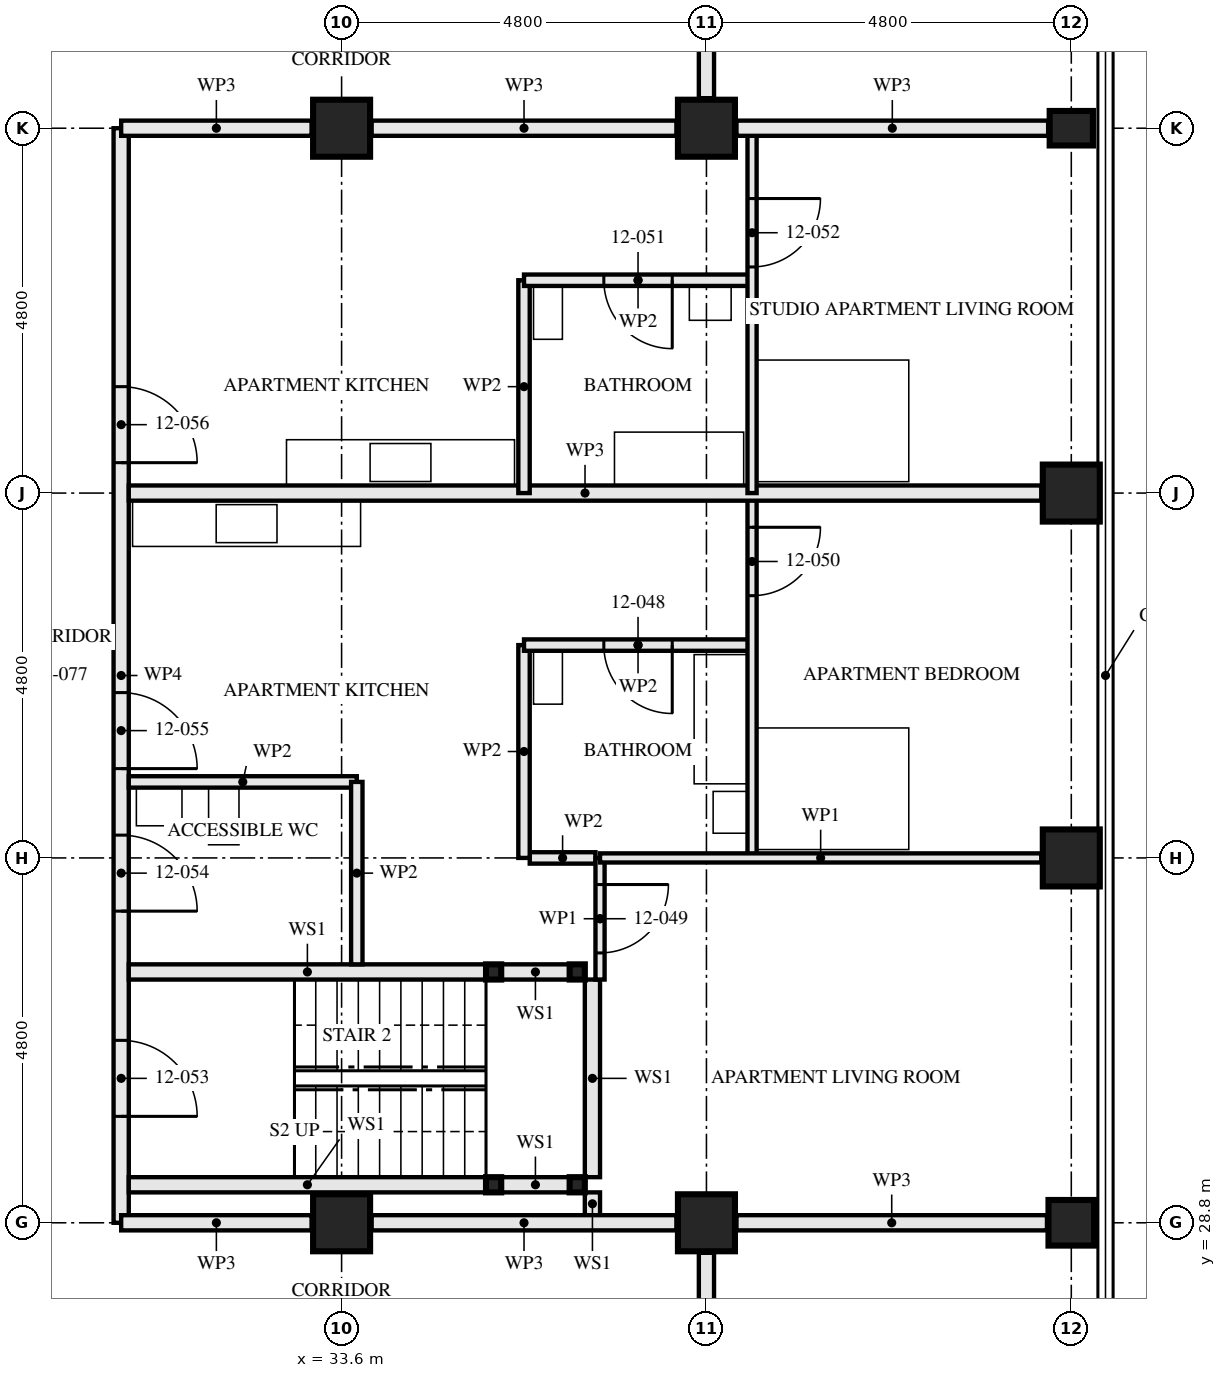
"""IFC4 building model, lengths in metres.
Left out: names, types, materials, properties, quantities, classifications, styles, units other than length and angle.
Written with IfcOpenShell. Run it as: python <this file> out.ifc"""

import sys

from ifc_helpers import new_model, si_unit, direction, frame, frame_2d, origin, origin_2d, place, context, subcontext, project, spatial, rectangle, hollow_rectangle, i_section, extrude, element, fill, save


model = new_model("IFC4")
c1 = context("Model", 3, precision=1e-05, world=origin(), true_north=direction((0.0, 1.0)))
c2 = subcontext(c1, "Body", "Model", "MODEL_VIEW")
j1 = project(units=[si_unit("LENGTHUNIT", "METRE"), si_unit("PLANEANGLEUNIT", "RADIAN")], contexts=[c1])
p1 = place(None, origin())
s1 = spatial("IfcSite", under=j1, at=p1, CompositionType="ELEMENT")
p2 = place(p1, origin())
s2 = spatial("IfcBuilding", under=s1, at=p2, CompositionType="ELEMENT")
p3 = place(p2, frame((0.0, 0.0, 48.0)))
s3 = spatial("IfcBuildingStorey", under=s2, at=p3, CompositionType="ELEMENT", Elevation=48.0)
for number, where, z_axis, x_axis in (
    (1, (33.6, 28.8, 0.0), (0.0, 0.0, 1.0), (0.0, 1.0, 0.0)),
    (2, (33.6, 43.2, 0.0), (0.0, 0.0, 1.0), (0.0, 1.0, 0.0)),
    (3, (38.4, 28.8, 0.0), (0.0, 0.0, 1.0), (0.0, 1.0, 0.0)),
    (4, (38.4, 43.2, 0.0), (0.0, 0.0, 1.0), (0.0, 1.0, 0.0)),
):
    element("IfcColumn", number, at=place(p3, frame(where, z_axis=z_axis, x_axis=x_axis)), inside=s3, PredefinedType="COLUMN", context=c2, shape_type="SweptSolid", body=[
        extrude(hollow_rectangle(XDim=0.75, YDim=0.75, WallThickness=0.08, at=origin_2d()), origin(), (0.0, 0.0, 1.0), 3.5),
    ])
p4 = place(p3, frame((43.2, 28.8, 0.0), z_axis=(0.0, 0.0, 1.0), x_axis=(0.0, 1.0, 0.0)))
e5 = element("IfcColumn", 5, at=p4, inside=s3, PredefinedType="COLUMN", context=c2, shape_type="SweptSolid", body=[
    extrude(hollow_rectangle(XDim=0.6, YDim=0.6, WallThickness=0.08, at=origin_2d()), origin(), (0.0, 0.0, 1.0), 3.5),
])
for number, where, z_axis, x_axis in (
    (6, (43.2, 33.6, 0.0), (0.0, 0.0, 1.0), (1.0, 0.0, 0.0)),
    (7, (43.2, 38.4, 0.0), (0.0, 0.0, 1.0), (1.0, 0.0, 0.0)),
):
    element("IfcColumn", number, at=place(p3, frame(where, z_axis=z_axis, x_axis=x_axis)), inside=s3, PredefinedType="COLUMN", context=c2, shape_type="SweptSolid", body=[
        extrude(hollow_rectangle(XDim=0.75, YDim=0.75, WallThickness=0.08, at=origin_2d()), origin(), (0.0, 0.0, 1.0), 3.5),
    ])
p5 = place(p3, frame((43.2, 43.2, 0.0), z_axis=(0.0, 0.0, 1.0), x_axis=(0.0, 1.0, 0.0)))
e8 = element("IfcColumn", 8, at=p5, inside=s3, PredefinedType="COLUMN", context=c2, shape_type="SweptSolid", body=[
    extrude(i_section(OverallWidth=0.454, OverallDepth=0.569, WebThickness=0.078, FlangeThickness=0.125, FilletRadius=0.015, at=origin_2d()), origin(), (0.0, 0.0, 1.0), 3.5),
])
for number, where, z_axis, x_axis in (
    (9, (36.7, 29.3, 0.0), (0.0, 0.0, 1.0), (1.0, 0.0, 0.0)),
    (10, (36.7, 32.1, 0.0), (0.0, 0.0, 1.0), (1.0, 0.0, 0.0)),
    (11, (35.6, 29.3, 0.0), (0.0, 0.0, 1.0), (1.0, 0.0, 0.0)),
    (12, (35.6, 32.1, 0.0), (0.0, 0.0, 1.0), (1.0, 0.0, 0.0)),
):
    element("IfcColumn", number, at=place(p3, frame(where, z_axis=z_axis, x_axis=x_axis)), inside=s3, PredefinedType="COLUMN", context=c2, shape_type="SweptSolid", body=[
        extrude(hollow_rectangle(XDim=0.2, YDim=0.2, WallThickness=0.008, at=origin_2d()), origin(), (0.0, 0.0, 1.0), 3.33),
    ])
p6 = place(p3, frame((38.4, 26.8, 0.0), z_axis=(0.0, 0.0, 1.0), x_axis=(0.0, 1.0, 0.0)))
e13 = element("IfcWall", 13, at=p6, inside=s3, PredefinedType="PARTITIONING", context=c2, shape_type="SweptSolid", body=[
    extrude(rectangle(XDim=1.605, YDim=0.2, at=frame_2d((0.802, 0.0))), origin(), (0.0, 0.0, 1.0), 3.33),
])
p7 = place(p3, frame((36.6, 29.3, 0.0), z_axis=(0.0, 0.0, 1.0), x_axis=(-1.0, 0.0, 0.0)))
e14 = element("IfcWall", 14, at=p7, inside=s3, PredefinedType="SOLIDWALL", context=c2, shape_type="SweptSolid", body=[
    extrude(rectangle(XDim=0.9, YDim=0.2, at=frame_2d((0.45, 0.0))), origin(), (0.0, 0.0, 1.0), 2.99),
])
p8 = place(p3, frame((35.5, 29.3, 0.0), z_axis=(0.0, 0.0, 1.0), x_axis=(-1.0, 0.0, 0.0)))
e15 = element("IfcWall", 15, at=p8, inside=s3, PredefinedType="SOLIDWALL", context=c2, shape_type="SweptSolid", body=[
    extrude(rectangle(XDim=4.7, YDim=0.2, at=frame_2d((2.35, 0.0))), origin(), (0.0, 0.0, 1.0), 2.99),
])
p9 = place(p3, frame((36.6, 32.1, 0.0), z_axis=(0.0, 0.0, 1.0), x_axis=(-1.0, 0.0, 0.0)))
e16 = element("IfcWall", 16, at=p9, inside=s3, PredefinedType="SOLIDWALL", context=c2, shape_type="SweptSolid", body=[
    extrude(rectangle(XDim=0.9, YDim=0.2, at=frame_2d((0.45, 0.0))), origin(), (0.0, 0.0, 1.0), 2.99),
])
p10 = place(p3, frame((35.5, 32.1, 0.0), z_axis=(0.0, 0.0, 1.0), x_axis=(-1.0, 0.0, 0.0)))
e17 = element("IfcWall", 17, at=p10, inside=s3, PredefinedType="SOLIDWALL", context=c2, shape_type="SweptSolid", body=[
    extrude(rectangle(XDim=4.7, YDim=0.2, at=frame_2d((2.35, 0.0))), origin(), (0.0, 0.0, 1.0), 2.99),
])
p11 = place(p3, frame((36.9, 28.9, 0.0), z_axis=(0.0, 0.0, 1.0), x_axis=(0.0, 1.0, 0.0)))
e18 = element("IfcWall", 18, at=p11, inside=s3, PredefinedType="SOLIDWALL", context=c2, shape_type="SweptSolid", body=[
    extrude(rectangle(XDim=0.3, YDim=0.2, at=frame_2d((0.15, 0.0))), origin(), (0.0, 0.0, 1.0), 3.33),
])
p12 = place(p3, frame((36.9, 29.4, 0.0), z_axis=(0.0, 0.0, 1.0), x_axis=(0.0, 1.0, 0.0)))
e19 = element("IfcWall", 19, at=p12, inside=s3, PredefinedType="SOLIDWALL", context=c2, shape_type="SweptSolid", body=[
    extrude(rectangle(XDim=2.6, YDim=0.2, at=frame_2d((1.3, 0.0))), origin(), (0.0, 0.0, 1.0), 3.33),
])
p13 = place(p3, frame((33.8, 32.2, 0.0), z_axis=(0.0, 0.0, 1.0), x_axis=(0.0, 1.0, 0.0)))
e20 = element("IfcWall", 20, at=p13, inside=s3, PredefinedType="PARTITIONING", context=c2, shape_type="SweptSolid", body=[
    extrude(rectangle(XDim=2.4, YDim=0.15, at=frame_2d((1.2, 0.0))), origin(), (0.0, 0.0, 1.0), 2.55),
])
p14 = place(p3, frame((33.8, 34.6, 0.0), z_axis=(0.0, 0.0, 1.0), x_axis=(-1.0, 0.0, 0.0)))
e21 = element("IfcWall", 21, at=p14, inside=s3, PredefinedType="PARTITIONING", context=c2, shape_type="SweptSolid", body=[
    extrude(rectangle(XDim=3.0, YDim=0.15, at=frame_2d((1.5, 0.0))), origin(), (0.0, 0.0, 1.0), 3.33),
])
p15 = place(p3, frame((39.0, 36.4, 0.0), z_axis=(0.0, 0.0, 1.0), x_axis=(-1.0, 0.0, 0.0)))
e22 = element("IfcWall", 22, at=p15, inside=s3, PredefinedType="PARTITIONING", context=c2, shape_type="SweptSolid", body=[
    extrude(rectangle(XDim=3.0, YDim=0.15, at=frame_2d((1.5, 0.0))), origin(), (0.0, 0.0, 1.0), 3.33),
])
p16 = place(p15, frame((1.05, 0.0, 0.0)))
e23 = element("IfcOpeningElement", 23, at=p16, cuts=e22, PredefinedType="OPENING", context=c2, shape_type="SweptSolid", body=[
    extrude(rectangle(XDim=0.9, YDim=2.1, at=frame_2d((0.45, 1.05))), frame((0.0, 0.085, 0.0), z_axis=(0.0, -1.0, 0.0), x_axis=(1.0, 0.0, 0.0)), (0.0, 0.0, 1.0), 0.171),
])
p17 = place(p3, frame((36.0, 33.6, 0.0), z_axis=(0.0, 0.0, 1.0), x_axis=(0.0, 1.0, 0.0)))
e24 = element("IfcWall", 24, at=p17, inside=s3, PredefinedType="PARTITIONING", context=c2, shape_type="SweptSolid", body=[
    extrude(rectangle(XDim=2.8, YDim=0.15, at=frame_2d((1.4, 0.0))), origin(), (0.0, 0.0, 1.0), 3.33),
])
p18 = place(p3, frame((37.0, 32.0, 0.0), z_axis=(0.0, 0.0, 1.0), x_axis=(0.0, 1.0, 0.0)))
e25 = element("IfcWall", 25, at=p18, inside=s3, PredefinedType="PARTITIONING", context=c2, shape_type="SweptSolid", body=[
    extrude(rectangle(XDim=1.6, YDim=0.12, at=frame_2d((0.8, 0.0))), origin(), (0.0, 0.0, 1.0), 3.33),
])
p19 = place(p18, frame((0.35, 0.0, 0.0)))
e26 = element("IfcOpeningElement", 26, at=p19, cuts=e25, PredefinedType="OPENING", context=c2, shape_type="SweptSolid", body=[
    extrude(rectangle(XDim=0.9, YDim=2.1, at=frame_2d((0.45, 1.05))), frame((0.0, 0.071, 0.0), z_axis=(0.0, -1.0, 0.0), x_axis=(1.0, 0.0, 0.0)), (0.0, 0.0, 1.0), 0.141),
])
p20 = place(p3, frame((39.0, 33.6, 0.0), z_axis=(0.0, 0.0, 1.0), x_axis=(0.0, 1.0, 0.0)))
e27 = element("IfcWall", 27, at=p20, inside=s3, PredefinedType="PARTITIONING", context=c2, shape_type="SweptSolid", body=[
    extrude(rectangle(XDim=4.8, YDim=0.12, at=frame_2d((2.4, 0.0))), origin(), (0.0, 0.0, 1.0), 3.33),
])
p21 = place(p20, frame((3.45, 0.0, 0.0)))
e28 = element("IfcOpeningElement", 28, at=p21, cuts=e27, PredefinedType="OPENING", context=c2, shape_type="SweptSolid", body=[
    extrude(rectangle(XDim=0.9, YDim=2.1, at=frame_2d((0.45, 1.05))), frame((0.0, 0.071, 0.0), z_axis=(0.0, -1.0, 0.0), x_axis=(1.0, 0.0, 0.0)), (0.0, 0.0, 1.0), 0.141),
])
p22 = place(p3, frame((42.805, 33.6, 0.0), z_axis=(0.0, 0.0, 1.0), x_axis=(-1.0, 0.0, 0.0)))
e29 = element("IfcWall", 29, at=p22, inside=s3, PredefinedType="PARTITIONING", context=c2, shape_type="SweptSolid", body=[
    extrude(rectangle(XDim=5.805, YDim=0.12, at=frame_2d((2.902, 0.0))), origin(), (0.0, 0.0, 1.0), 2.55),
])
p23 = place(p3, frame((42.805, 38.4, 0.0), z_axis=(0.0, 0.0, 1.0), x_axis=(-1.0, 0.0, 0.0)))
e30 = element("IfcWall", 30, at=p23, inside=s3, PredefinedType="PARTITIONING", context=c2, shape_type="SweptSolid", body=[
    extrude(rectangle(XDim=12.005, YDim=0.2, at=frame_2d((6.002, 0.0))), origin(), (0.0, 0.0, 1.0), 2.55),
])
p24 = place(p3, frame((39.0, 41.2, 0.0), z_axis=(0.0, 0.0, 1.0), x_axis=(-1.0, 0.0, 0.0)))
e31 = element("IfcWall", 31, at=p24, inside=s3, PredefinedType="PARTITIONING", context=c2, shape_type="SweptSolid", body=[
    extrude(rectangle(XDim=3.0, YDim=0.15, at=frame_2d((1.5, 0.0))), origin(), (0.0, 0.0, 1.0), 3.33),
])
p25 = place(p24, frame((1.05, 0.0, 0.0)))
e32 = element("IfcOpeningElement", 32, at=p25, cuts=e31, PredefinedType="OPENING", context=c2, shape_type="SweptSolid", body=[
    extrude(rectangle(XDim=0.9, YDim=2.1, at=frame_2d((0.45, 1.05))), frame((0.0, 0.085, 0.0), z_axis=(0.0, -1.0, 0.0), x_axis=(1.0, 0.0, 0.0)), (0.0, 0.0, 1.0), 0.171),
])
p26 = place(p3, frame((36.0, 38.4, 0.0), z_axis=(0.0, 0.0, 1.0), x_axis=(0.0, 1.0, 0.0)))
e33 = element("IfcWall", 33, at=p26, inside=s3, PredefinedType="PARTITIONING", context=c2, shape_type="SweptSolid", body=[
    extrude(rectangle(XDim=2.8, YDim=0.15, at=frame_2d((1.4, 0.0))), origin(), (0.0, 0.0, 1.0), 3.33),
])
p27 = place(p3, frame((39.0, 38.4, 0.0), z_axis=(0.0, 0.0, 1.0), x_axis=(0.0, 1.0, 0.0)))
e34 = element("IfcWall", 34, at=p27, inside=s3, PredefinedType="PARTITIONING", context=c2, shape_type="SweptSolid", body=[
    extrude(rectangle(XDim=4.8, YDim=0.12, at=frame_2d((2.4, 0.0))), origin(), (0.0, 0.0, 1.0), 3.33),
])
p28 = place(p27, frame((2.975, 0.0, 0.0)))
e35 = element("IfcOpeningElement", 35, at=p28, cuts=e34, PredefinedType="OPENING", context=c2, shape_type="SweptSolid", body=[
    extrude(rectangle(XDim=0.9, YDim=2.1, at=frame_2d((0.45, 1.05))), frame((0.0, 0.071, 0.0), z_axis=(0.0, -1.0, 0.0), x_axis=(1.0, 0.0, 0.0)), (0.0, 0.0, 1.0), 0.141),
])
p29 = place(p3, frame((30.7, 28.8, 0.0), z_axis=(0.0, 0.0, 1.0), x_axis=(0.0, 1.0, 0.0)))
e36 = element("IfcWall", 36, at=p29, inside=s3, PredefinedType="PARTITIONING", context=c2, shape_type="SweptSolid", body=[
    extrude(rectangle(XDim=14.4, YDim=0.2, at=frame_2d((7.2, 0.0))), origin(), (0.0, 0.0, 1.0), 2.55),
])
p30 = place(p29, frame((1.4, 0.0, 0.0)))
e37 = element("IfcOpeningElement", 37, at=p30, cuts=e36, PredefinedType="OPENING", context=c2, shape_type="SweptSolid", body=[
    extrude(rectangle(XDim=1.0, YDim=2.1, at=frame_2d((0.5, 1.05))), frame((0.0, 0.111, 0.0), z_axis=(0.0, -1.0, 0.0), x_axis=(1.0, 0.0, 0.0)), (0.0, 0.0, 1.0), 0.221),
])
p31 = place(p29, frame((4.1, 0.0, 0.0)))
e38 = element("IfcOpeningElement", 38, at=p31, cuts=e36, PredefinedType="OPENING", context=c2, shape_type="SweptSolid", body=[
    extrude(rectangle(XDim=1.0, YDim=2.1, at=frame_2d((0.5, 1.05))), frame((0.0, 0.111, 0.0), z_axis=(0.0, -1.0, 0.0), x_axis=(1.0, 0.0, 0.0)), (0.0, 0.0, 1.0), 0.221),
])
p32 = place(p29, frame((5.975, 0.0, 0.0)))
e39 = element("IfcOpeningElement", 39, at=p32, cuts=e36, PredefinedType="OPENING", context=c2, shape_type="SweptSolid", body=[
    extrude(rectangle(XDim=1.0, YDim=2.1, at=frame_2d((0.5, 1.05))), frame((0.0, 0.111, 0.0), z_axis=(0.0, -1.0, 0.0), x_axis=(1.0, 0.0, 0.0)), (0.0, 0.0, 1.0), 0.221),
])
p33 = place(p29, frame((10.0, 0.0, 0.0)))
e40 = element("IfcOpeningElement", 40, at=p33, cuts=e36, PredefinedType="OPENING", context=c2, shape_type="SweptSolid", body=[
    extrude(rectangle(XDim=1.0, YDim=2.1, at=frame_2d((0.5, 1.05))), frame((0.0, 0.111, 0.0), z_axis=(0.0, -1.0, 0.0), x_axis=(1.0, 0.0, 0.0)), (0.0, 0.0, 1.0), 0.221),
])
p34 = place(p3, frame((38.4, 45.2, 0.0), z_axis=(0.0, 0.0, 1.0), x_axis=(0.0, -1.0, 0.0)))
e41 = element("IfcWall", 41, at=p34, inside=s3, PredefinedType="PARTITIONING", context=c2, shape_type="SweptSolid", body=[
    extrude(rectangle(XDim=1.605, YDim=0.2, at=frame_2d((0.802, 0.0))), origin(), (0.0, 0.0, 1.0), 3.33),
])
p35 = place(p3, frame((42.88, 28.8, 0.0), z_axis=(0.0, 0.0, 1.0), x_axis=(-1.0, 0.0, 0.0)))
e42 = element("IfcWall", 42, at=p35, inside=s3, PredefinedType="PARTITIONING", context=c2, shape_type="SweptSolid", body=[
    extrude(rectangle(XDim=4.085, YDim=0.2, at=frame_2d((2.042, 0.0))), origin(), (0.0, 0.0, 1.0), 2.32),
])
p36 = place(p3, frame((38.005, 28.8, 0.0), z_axis=(0.0, 0.0, 1.0), x_axis=(-1.0, 0.0, 0.0)))
e43 = element("IfcWall", 43, at=p36, inside=s3, PredefinedType="PARTITIONING", context=c2, shape_type="SweptSolid", body=[
    extrude(rectangle(XDim=4.01, YDim=0.2, at=frame_2d((2.005, 0.0))), origin(), (0.0, 0.0, 1.0), 2.32),
])
p37 = place(p3, frame((33.205, 28.8, 0.0), z_axis=(0.0, 0.0, 1.0), x_axis=(-1.0, 0.0, 0.0)))
e44 = element("IfcWall", 44, at=p37, inside=s3, PredefinedType="PARTITIONING", context=c2, shape_type="SweptSolid", body=[
    extrude(rectangle(XDim=2.505, YDim=0.2, at=frame_2d((1.252, 0.0))), origin(), (0.0, 0.0, 1.0), 2.32),
])
p38 = place(p3, frame((42.896, 43.2, 0.0), z_axis=(0.0, 0.0, 1.0), x_axis=(-1.0, 0.0, 0.0)))
e45 = element("IfcWall", 45, at=p38, inside=s3, PredefinedType="PARTITIONING", context=c2, shape_type="SweptSolid", body=[
    extrude(rectangle(XDim=4.101, YDim=0.2, at=frame_2d((2.05, 0.0))), origin(), (0.0, 0.0, 1.0), 2.32),
])
p39 = place(p3, frame((38.005, 43.2, 0.0), z_axis=(0.0, 0.0, 1.0), x_axis=(-1.0, 0.0, 0.0)))
e46 = element("IfcWall", 46, at=p39, inside=s3, PredefinedType="PARTITIONING", context=c2, shape_type="SweptSolid", body=[
    extrude(rectangle(XDim=4.01, YDim=0.2, at=frame_2d((2.005, 0.0))), origin(), (0.0, 0.0, 1.0), 2.32),
])
p40 = place(p3, frame((33.205, 43.2, 0.0), z_axis=(0.0, 0.0, 1.0), x_axis=(-1.0, 0.0, 0.0)))
e47 = element("IfcWall", 47, at=p40, inside=s3, PredefinedType="PARTITIONING", context=c2, shape_type="SweptSolid", body=[
    extrude(rectangle(XDim=2.505, YDim=0.2, at=frame_2d((1.252, 0.0))), origin(), (0.0, 0.0, 1.0), 2.32),
])
p41 = place(p3, frame((36.94, 33.6, 0.0), z_axis=(0.0, 0.0, 1.0), x_axis=(-1.0, 0.0, 0.0)))
e48 = element("IfcWall", 48, at=p41, inside=s3, PredefinedType="PARTITIONING", context=c2, shape_type="SweptSolid", body=[
    extrude(rectangle(XDim=0.865, YDim=0.15, at=frame_2d((0.433, 0.0))), origin(), (0.0, 0.0, 1.0), 2.55),
])
p42 = place(p16, origin())
e49 = element("IfcDoor", 49, at=p42, inside=s3, OperationType="SINGLE_SWING_RIGHT", PredefinedType="DOOR", context=c2, shape_type="SweptSolid", body=[
    extrude(rectangle(XDim=0.9, YDim=2.1, at=frame_2d((0.45, 1.05))), frame((0.0, 0.022, 0.0), z_axis=(0.0, -1.0, 0.0), x_axis=(1.0, 0.0, 0.0)), (0.0, 0.0, 1.0), 0.044),
])
fill(e23, e49)
p43 = place(p19, frame((0.9, 0.0, 0.0), z_axis=(0.0, 0.0, 1.0), x_axis=(-1.0, 0.0, 0.0)))
e50 = element("IfcDoor", 50, at=p43, inside=s3, OperationType="SINGLE_SWING_RIGHT", PredefinedType="DOOR", context=c2, shape_type="SweptSolid", body=[
    extrude(rectangle(XDim=0.9, YDim=2.1, at=frame_2d((0.45, 1.05))), frame((0.0, 0.022, 0.0), z_axis=(0.0, -1.0, 0.0), x_axis=(1.0, 0.0, 0.0)), (0.0, 0.0, 1.0), 0.044),
])
fill(e26, e50)
p44 = place(p21, frame((0.9, 0.0, 0.0), z_axis=(0.0, 0.0, 1.0), x_axis=(-1.0, 0.0, 0.0)))
e51 = element("IfcDoor", 51, at=p44, inside=s3, OperationType="SINGLE_SWING_RIGHT", PredefinedType="DOOR", context=c2, shape_type="SweptSolid", body=[
    extrude(rectangle(XDim=0.9, YDim=2.1, at=frame_2d((0.45, 1.05))), frame((0.0, 0.022, 0.0), z_axis=(0.0, -1.0, 0.0), x_axis=(1.0, 0.0, 0.0)), (0.0, 0.0, 1.0), 0.044),
])
fill(e28, e51)
p45 = place(p25, origin())
e52 = element("IfcDoor", 52, at=p45, inside=s3, OperationType="SINGLE_SWING_RIGHT", PredefinedType="DOOR", context=c2, shape_type="SweptSolid", body=[
    extrude(rectangle(XDim=0.9, YDim=2.1, at=frame_2d((0.45, 1.05))), frame((0.0, 0.022, 0.0), z_axis=(0.0, -1.0, 0.0), x_axis=(1.0, 0.0, 0.0)), (0.0, 0.0, 1.0), 0.044),
])
fill(e32, e52)
p46 = place(p28, frame((0.9, 0.0, 0.0), z_axis=(0.0, 0.0, 1.0), x_axis=(-1.0, 0.0, 0.0)))
e53 = element("IfcDoor", 53, at=p46, inside=s3, OperationType="SINGLE_SWING_RIGHT", PredefinedType="DOOR", context=c2, shape_type="SweptSolid", body=[
    extrude(rectangle(XDim=0.9, YDim=2.1, at=frame_2d((0.45, 1.05))), frame((0.0, 0.022, 0.0), z_axis=(0.0, -1.0, 0.0), x_axis=(1.0, 0.0, 0.0)), (0.0, 0.0, 1.0), 0.044),
])
fill(e35, e53)
p47 = place(p30, frame((1.0, 0.0, 0.0), z_axis=(0.0, 0.0, 1.0), x_axis=(-1.0, 0.0, 0.0)))
e54 = element("IfcDoor", 54, at=p47, inside=s3, OperationType="SINGLE_SWING_LEFT", PredefinedType="DOOR", context=c2, shape_type="SweptSolid", body=[
    extrude(rectangle(XDim=1.0, YDim=2.1, at=frame_2d((0.5, 1.05))), frame((0.0, 0.032, 0.0), z_axis=(0.0, -1.0, 0.0), x_axis=(1.0, 0.0, 0.0)), (0.0, 0.0, 1.0), 0.064),
])
fill(e37, e54)
p48 = place(p31, frame((1.0, 0.0, 0.0), z_axis=(0.0, 0.0, 1.0), x_axis=(-1.0, 0.0, 0.0)))
e55 = element("IfcDoor", 55, at=p48, inside=s3, OperationType="SINGLE_SWING_LEFT", PredefinedType="DOOR", context=c2, shape_type="SweptSolid", body=[
    extrude(rectangle(XDim=1.0, YDim=2.1, at=frame_2d((0.5, 1.05))), frame((0.0, 0.027, 0.0), z_axis=(0.0, -1.0, 0.0), x_axis=(1.0, 0.0, 0.0)), (0.0, 0.0, 1.0), 0.054),
])
fill(e38, e55)
p49 = place(p32, frame((1.0, 0.0, 0.0), z_axis=(0.0, 0.0, 1.0), x_axis=(-1.0, 0.0, 0.0)))
e56 = element("IfcDoor", 56, at=p49, inside=s3, OperationType="SINGLE_SWING_LEFT", PredefinedType="DOOR", context=c2, shape_type="SweptSolid", body=[
    extrude(rectangle(XDim=1.0, YDim=2.1, at=frame_2d((0.5, 1.05))), frame((0.0, 0.027, 0.0), z_axis=(0.0, -1.0, 0.0), x_axis=(1.0, 0.0, 0.0)), (0.0, 0.0, 1.0), 0.054),
])
fill(e39, e56)
p50 = place(p33, frame((1.0, 0.0, 0.0), z_axis=(0.0, 0.0, 1.0), x_axis=(-1.0, 0.0, 0.0)))
e57 = element("IfcDoor", 57, at=p50, inside=s3, OperationType="SINGLE_SWING_LEFT", PredefinedType="DOOR", context=c2, shape_type="SweptSolid", body=[
    extrude(rectangle(XDim=1.0, YDim=2.1, at=frame_2d((0.5, 1.05))), frame((0.0, 0.027, 0.0), z_axis=(0.0, -1.0, 0.0), x_axis=(1.0, 0.0, 0.0)), (0.0, 0.0, 1.0), 0.054),
])
fill(e40, e57)
save(model, sys.argv[1])
